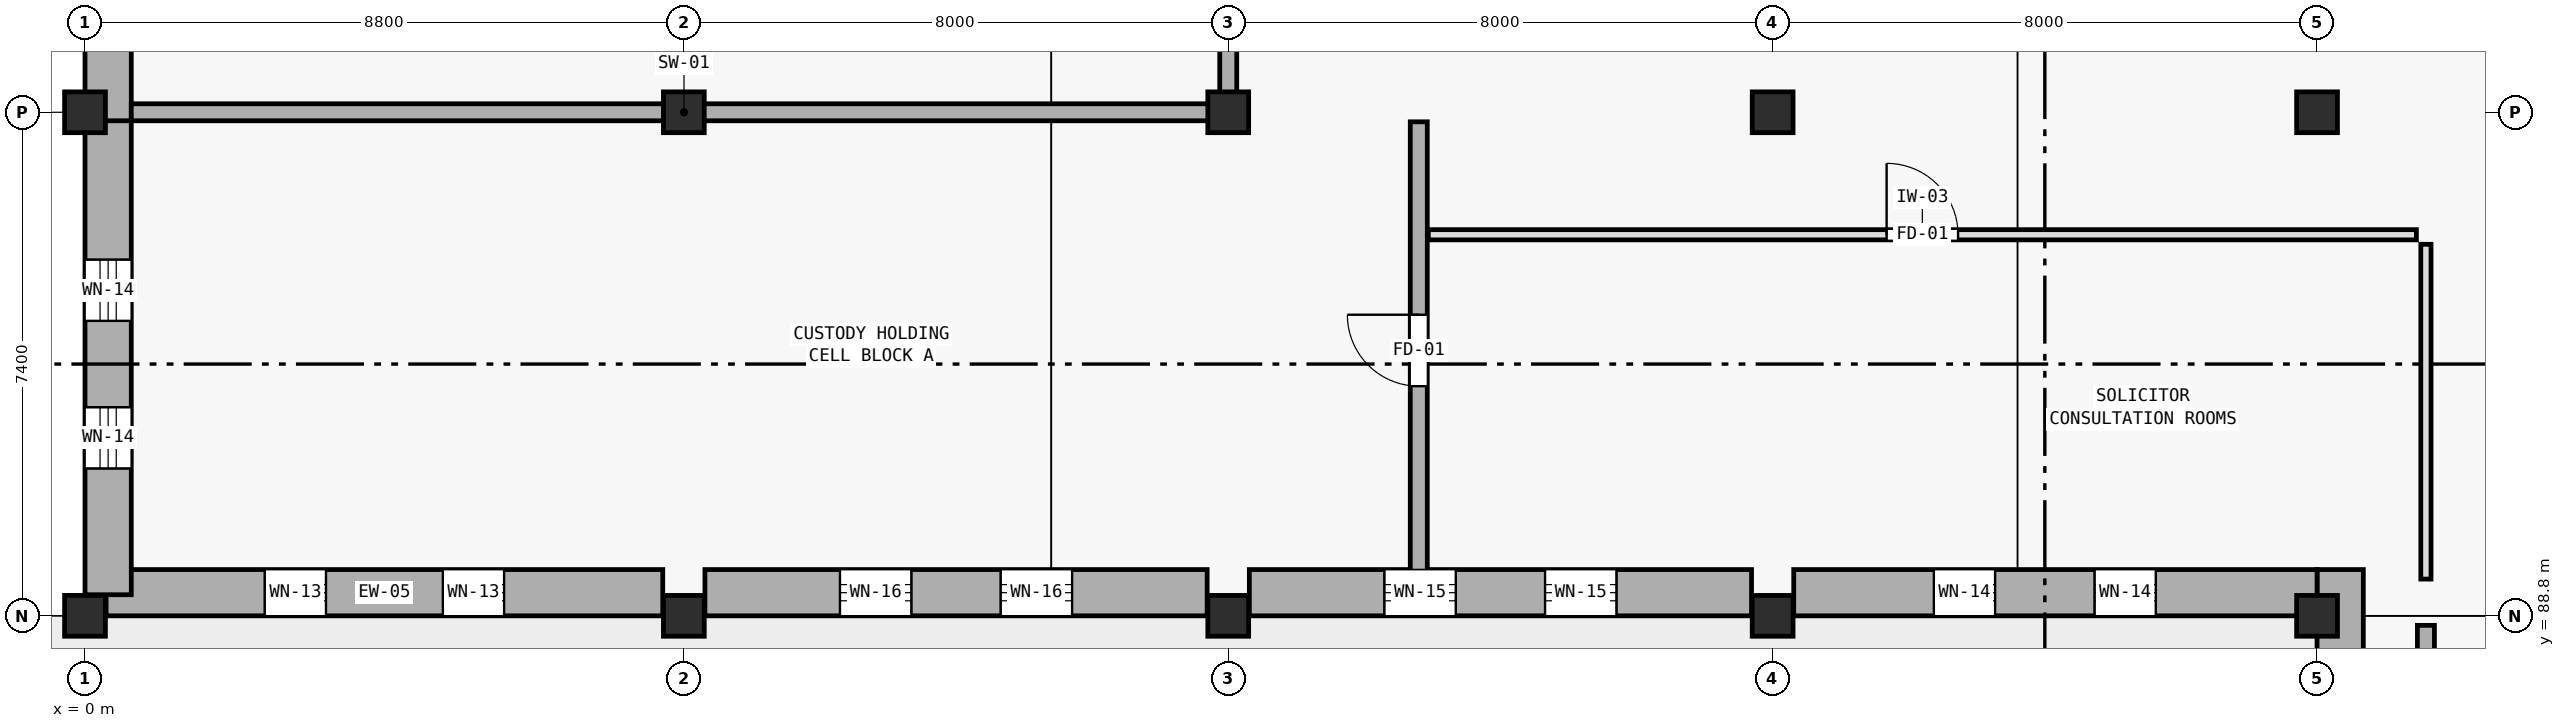
"""IFC4 building model, lengths in metres.
Left out: names, types, materials, properties, quantities, classifications, styles, units other than length and angle.
Written with IfcOpenShell. Run it as: python <this file> out.ifc"""

import sys

from ifc_helpers import new_model, si_unit, direction, frame, frame_2d, origin, origin_2d, place, context, subcontext, project, spatial, rectangle, extrude, element, fill, save


model = new_model("IFC4")
c1 = context("Model", 3, precision=1e-05, world=origin(), true_north=direction((0.0, 1.0)))
c2 = subcontext(c1, "Body", "Model", "MODEL_VIEW")
j1 = project(units=[si_unit("LENGTHUNIT", "METRE"), si_unit("PLANEANGLEUNIT", "RADIAN")], contexts=[c1])
p1 = place(None, origin())
s1 = spatial("IfcSite", under=j1, at=p1, CompositionType="ELEMENT")
p2 = place(p1, origin())
s2 = spatial("IfcBuilding", under=s1, at=p2, CompositionType="ELEMENT")
p3 = place(p2, origin())
s3 = spatial("IfcBuildingStorey", under=s2, at=p3, CompositionType="ELEMENT", Elevation=0.0)
for number, where, z_axis, x_axis in (
    (1, (0.0, 88.8, 0.0), (0.0, 0.0, 1.0), (1.0, 0.0, 0.0)),
    (2, (0.0, 96.2, 0.0), (0.0, 0.0, 1.0), (1.0, 0.0, 0.0)),
    (3, (8.8, 88.8, 0.0), (0.0, 0.0, 1.0), (1.0, 0.0, 0.0)),
    (4, (8.8, 96.2, 0.0), (0.0, 0.0, 1.0), (1.0, 0.0, 0.0)),
    (5, (16.8, 88.8, 0.0), (0.0, 0.0, 1.0), (1.0, 0.0, 0.0)),
    (6, (16.8, 96.2, 0.0), (0.0, 0.0, 1.0), (1.0, 0.0, 0.0)),
    (7, (24.8, 88.8, 0.0), (0.0, 0.0, 1.0), (1.0, 0.0, 0.0)),
    (8, (24.8, 96.2, 0.0), (0.0, 0.0, 1.0), (1.0, 0.0, 0.0)),
    (9, (32.8, 88.8, 0.0), (0.0, 0.0, 1.0), (1.0, 0.0, 0.0)),
    (10, (32.8, 96.2, 0.0), (0.0, 0.0, 1.0), (1.0, 0.0, 0.0)),
):
    element("IfcColumn", number, at=place(p3, frame(where, z_axis=z_axis, x_axis=x_axis)), inside=s3, PredefinedType="COLUMN", context=c2, shape_type="SweptSolid", body=[
        extrude(rectangle(XDim=0.6, YDim=0.6, at=origin_2d()), origin(), (0.0, 0.0, 1.0), 5.4),
    ])
p4 = place(p3, frame((33.14, 81.71, 0.0), z_axis=(0.0, 0.0, 1.0), x_axis=(0.0, 1.0, 0.0)))
e11 = element("IfcWall", 11, at=p4, inside=s3, PredefinedType="SOLIDWALL", context=c2, shape_type="SweptSolid", body=[
    extrude(rectangle(XDim=7.77, YDim=0.68, at=frame_2d((3.885, 0.0))), origin(), (0.0, 0.0, 1.0), 5.14),
])
p5 = place(p4, frame((1.855, 0.0, 1.8)))
e12 = element("IfcOpeningElement", 12, at=p5, cuts=e11, PredefinedType="OPENING", context=c2, shape_type="SweptSolid", body=[
    extrude(rectangle(XDim=0.9, YDim=0.9, at=frame_2d((0.45, 0.45))), frame((0.0, 0.35, 0.0), z_axis=(0.0, -1.0, 0.0), x_axis=(1.0, 0.0, 0.0)), (0.0, 0.0, 1.0), 0.7),
])
p6 = place(p4, frame((4.025, 0.0, 1.8)))
e13 = element("IfcOpeningElement", 13, at=p6, cuts=e11, PredefinedType="OPENING", context=c2, shape_type="SweptSolid", body=[
    extrude(rectangle(XDim=0.9, YDim=0.9, at=frame_2d((0.45, 0.45))), frame((0.0, 0.35, 0.0), z_axis=(0.0, -1.0, 0.0), x_axis=(1.0, 0.0, 0.0)), (0.0, 0.0, 1.0), 0.7),
])
p7 = place(p3, frame((32.8, 89.14, 0.0), z_axis=(0.0, 0.0, 1.0), x_axis=(-1.0, 0.0, 0.0)))
e14 = element("IfcWall", 14, at=p7, inside=s3, PredefinedType="SOLIDWALL", context=c2, shape_type="SweptSolid", body=[
    extrude(rectangle(XDim=7.69, YDim=0.68, at=frame_2d((3.845, 0.0))), origin(), (0.0, 0.0, 1.0), 5.14),
])
p8 = place(p7, frame((2.369, 0.0, 1.8)))
e15 = element("IfcOpeningElement", 15, at=p8, cuts=e14, PredefinedType="OPENING", context=c2, shape_type="SweptSolid", body=[
    extrude(rectangle(XDim=0.9, YDim=1.15, at=frame_2d((0.45, 0.575))), frame((0.0, 0.35, 0.0), z_axis=(0.0, -1.0, 0.0), x_axis=(1.0, 0.0, 0.0)), (0.0, 0.0, 1.0), 0.7),
])
p9 = place(p7, frame((4.731, 0.0, 1.8)))
e16 = element("IfcOpeningElement", 16, at=p9, cuts=e14, PredefinedType="OPENING", context=c2, shape_type="SweptSolid", body=[
    extrude(rectangle(XDim=0.9, YDim=1.15, at=frame_2d((0.45, 0.575))), frame((0.0, 0.35, 0.0), z_axis=(0.0, -1.0, 0.0), x_axis=(1.0, 0.0, 0.0)), (0.0, 0.0, 1.0), 0.7),
])
p10 = place(p3, frame((24.49, 89.14, 0.0), z_axis=(0.0, 0.0, 1.0), x_axis=(-1.0, 0.0, 0.0)))
e17 = element("IfcWall", 17, at=p10, inside=s3, PredefinedType="SOLIDWALL", context=c2, shape_type="SweptSolid", body=[
    extrude(rectangle(XDim=7.38, YDim=0.68, at=frame_2d((3.69, 0.0))), origin(), (0.0, 0.0, 1.0), 5.14),
])
p11 = place(p10, frame((1.984, 0.0, 1.8)))
e18 = element("IfcOpeningElement", 18, at=p11, cuts=e17, PredefinedType="OPENING", context=c2, shape_type="SweptSolid", body=[
    extrude(rectangle(XDim=1.05, YDim=0.95, at=frame_2d((0.525, 0.475))), frame((0.0, 0.35, 0.0), z_axis=(0.0, -1.0, 0.0), x_axis=(1.0, 0.0, 0.0)), (0.0, 0.0, 1.0), 0.7),
])
p12 = place(p10, frame((4.346, 0.0, 1.8)))
e19 = element("IfcOpeningElement", 19, at=p12, cuts=e17, PredefinedType="OPENING", context=c2, shape_type="SweptSolid", body=[
    extrude(rectangle(XDim=1.05, YDim=0.95, at=frame_2d((0.525, 0.475))), frame((0.0, 0.35, 0.0), z_axis=(0.0, -1.0, 0.0), x_axis=(1.0, 0.0, 0.0)), (0.0, 0.0, 1.0), 0.7),
])
p13 = place(p3, frame((16.49, 89.14, 0.0), z_axis=(0.0, 0.0, 1.0), x_axis=(-1.0, 0.0, 0.0)))
e20 = element("IfcWall", 20, at=p13, inside=s3, PredefinedType="SOLIDWALL", context=c2, shape_type="SweptSolid", body=[
    extrude(rectangle(XDim=7.38, YDim=0.68, at=frame_2d((3.69, 0.0))), origin(), (0.0, 0.0, 1.0), 5.14),
])
p14 = place(p13, frame((1.984, 0.0, 1.8)))
e21 = element("IfcOpeningElement", 21, at=p14, cuts=e20, PredefinedType="OPENING", context=c2, shape_type="SweptSolid", body=[
    extrude(rectangle(XDim=1.05, YDim=1.2, at=frame_2d((0.525, 0.6))), frame((0.0, 0.35, 0.0), z_axis=(0.0, -1.0, 0.0), x_axis=(1.0, 0.0, 0.0)), (0.0, 0.0, 1.0), 0.7),
])
p15 = place(p13, frame((4.346, 0.0, 1.8)))
e22 = element("IfcOpeningElement", 22, at=p15, cuts=e20, PredefinedType="OPENING", context=c2, shape_type="SweptSolid", body=[
    extrude(rectangle(XDim=1.05, YDim=1.2, at=frame_2d((0.525, 0.6))), frame((0.0, 0.35, 0.0), z_axis=(0.0, -1.0, 0.0), x_axis=(1.0, 0.0, 0.0)), (0.0, 0.0, 1.0), 0.7),
])
p16 = place(p3, frame((8.49, 89.14, 0.0), z_axis=(0.0, 0.0, 1.0), x_axis=(-1.0, 0.0, 0.0)))
e23 = element("IfcWall", 23, at=p16, inside=s3, PredefinedType="SOLIDWALL", context=c2, shape_type="SweptSolid", body=[
    extrude(rectangle(XDim=8.18, YDim=0.68, at=frame_2d((4.09, 0.0))), origin(), (0.0, 0.0, 1.0), 5.14),
])
p17 = place(p16, frame((2.331, 0.0, 1.8)))
e24 = element("IfcOpeningElement", 24, at=p17, cuts=e23, PredefinedType="OPENING", context=c2, shape_type="SweptSolid", body=[
    extrude(rectangle(XDim=0.9, YDim=0.9, at=frame_2d((0.45, 0.45))), frame((0.0, 0.35, 0.0), z_axis=(0.0, -1.0, 0.0), x_axis=(1.0, 0.0, 0.0)), (0.0, 0.0, 1.0), 0.7),
])
p18 = place(p16, frame((4.949, 0.0, 1.8)))
e25 = element("IfcOpeningElement", 25, at=p18, cuts=e23, PredefinedType="OPENING", context=c2, shape_type="SweptSolid", body=[
    extrude(rectangle(XDim=0.9, YDim=0.9, at=frame_2d((0.45, 0.45))), frame((0.0, 0.35, 0.0), z_axis=(0.0, -1.0, 0.0), x_axis=(1.0, 0.0, 0.0)), (0.0, 0.0, 1.0), 0.7),
])
p19 = place(p3, frame((0.34, 89.11, 0.0), z_axis=(0.0, 0.0, 1.0), x_axis=(0.0, 1.0, 0.0)))
e26 = element("IfcWall", 26, at=p19, inside=s3, PredefinedType="SOLIDWALL", context=c2, shape_type="SweptSolid", body=[
    extrude(rectangle(XDim=7.215, YDim=0.68, at=frame_2d((3.607, 0.0))), origin(), (0.0, 0.0, 1.0), 5.14),
])
p20 = place(p19, frame((1.855, 0.0, 1.8)))
e27 = element("IfcOpeningElement", 27, at=p20, cuts=e26, PredefinedType="OPENING", context=c2, shape_type="SweptSolid", body=[
    extrude(rectangle(XDim=0.9, YDim=1.15, at=frame_2d((0.45, 0.575))), frame((0.0, 0.35, 0.0), z_axis=(0.0, -1.0, 0.0), x_axis=(1.0, 0.0, 0.0)), (0.0, 0.0, 1.0), 0.7),
])
p21 = place(p19, frame((4.025, 0.0, 1.8)))
e28 = element("IfcOpeningElement", 28, at=p21, cuts=e26, PredefinedType="OPENING", context=c2, shape_type="SweptSolid", body=[
    extrude(rectangle(XDim=0.9, YDim=1.15, at=frame_2d((0.45, 0.575))), frame((0.0, 0.35, 0.0), z_axis=(0.0, -1.0, 0.0), x_axis=(1.0, 0.0, 0.0)), (0.0, 0.0, 1.0), 0.7),
])
p22 = place(p3, frame((0.34, 96.075, 0.0), z_axis=(0.0, 0.0, 1.0), x_axis=(0.0, 1.0, 0.0)))
e29 = element("IfcWall", 29, at=p22, inside=s3, PredefinedType="SOLIDWALL", context=c2, shape_type="SweptSolid", body=[
    extrude(rectangle(XDim=7.215, YDim=0.68, at=frame_2d((3.607, 0.0))), origin(), (0.0, 0.0, 1.0), 5.14),
])
p23 = place(p22, frame((1.725, 0.0, 0.0)))
e30 = element("IfcOpeningElement", 30, at=p23, cuts=e29, PredefinedType="OPENING", context=c2, shape_type="SweptSolid", body=[
    extrude(rectangle(XDim=4.2, YDim=4.2, at=frame_2d((2.1, 2.1))), frame((0.0, 0.35, 0.0), z_axis=(0.0, -1.0, 0.0), x_axis=(1.0, 0.0, 0.0)), (0.0, 0.0, 1.0), 0.7),
])
p24 = place(p3, frame((0.68, 96.2, 0.0), z_axis=(0.0, 0.0, 1.0), x_axis=(1.0, 0.0, 0.0)))
e31 = element("IfcWall", 31, at=p24, inside=s3, PredefinedType="SOLIDWALL", context=c2, shape_type="SweptSolid", body=[
    extrude(rectangle(XDim=16.245, YDim=0.25, at=frame_2d((8.123, 0.0))), origin(), (0.0, 0.0, 1.0), 4.27),
])
p25 = place(p3, frame((16.8, 96.325, 0.0), z_axis=(0.0, 0.0, 1.0), x_axis=(0.0, 1.0, 0.0)))
e32 = element("IfcWall", 32, at=p25, inside=s3, PredefinedType="SOLIDWALL", context=c2, shape_type="SweptSolid", body=[
    extrude(rectangle(XDim=13.995, YDim=0.25, at=frame_2d((6.998, 0.0))), origin(), (0.0, 0.0, 1.0), 4.27),
])
p26 = place(p25, frame((4.675, 0.0, 0.0)))
e33 = element("IfcOpeningElement", 33, at=p26, cuts=e32, PredefinedType="OPENING", context=c2, shape_type="SweptSolid", body=[
    extrude(rectangle(XDim=1.15, YDim=2.15, at=frame_2d((0.575, 1.075))), frame((0.0, 0.135, 0.0), z_axis=(0.0, -1.0, 0.0), x_axis=(1.0, 0.0, 0.0)), (0.0, 0.0, 1.0), 0.27),
])
p27 = place(p3, frame((19.6, 89.34, 0.0), z_axis=(0.0, 0.0, 1.0), x_axis=(0.0, 1.0, 0.0)))
e34 = element("IfcWall", 34, at=p27, inside=s3, PredefinedType="SOLIDWALL", context=c2, shape_type="SweptSolid", body=[
    extrude(rectangle(XDim=6.72, YDim=0.25, at=frame_2d((3.36, 0.0))), origin(), (0.0, 0.0, 1.0), 4.27),
])
p28 = place(p27, frame((2.835, 0.0, 0.0)))
e35 = element("IfcOpeningElement", 35, at=p28, cuts=e34, PredefinedType="OPENING", context=c2, shape_type="SweptSolid", body=[
    extrude(rectangle(XDim=1.05, YDim=2.15, at=frame_2d((0.525, 1.075))), frame((0.0, 0.135, 0.0), z_axis=(0.0, -1.0, 0.0), x_axis=(1.0, 0.0, 0.0)), (0.0, 0.0, 1.0), 0.27),
])
p29 = place(p3, frame((19.74, 94.4, 0.0), z_axis=(0.0, 0.0, 1.0), x_axis=(1.0, 0.0, 0.0)))
e36 = element("IfcWall", 36, at=p29, inside=s3, PredefinedType="PARTITIONING", context=c2, shape_type="SweptSolid", body=[
    extrude(rectangle(XDim=14.52, YDim=0.15, at=frame_2d((7.26, 0.0))), origin(), (0.0, 0.0, 1.0), 4.27),
])
p30 = place(p29, frame((6.735, 0.0, 0.0)))
e37 = element("IfcOpeningElement", 37, at=p30, cuts=e36, PredefinedType="OPENING", context=c2, shape_type="SweptSolid", body=[
    extrude(rectangle(XDim=1.05, YDim=2.15, at=frame_2d((0.525, 1.075))), frame((0.0, 0.085, 0.0), z_axis=(0.0, -1.0, 0.0), x_axis=(1.0, 0.0, 0.0)), (0.0, 0.0, 1.0), 0.17),
])
p31 = place(p3, frame((34.4, 89.34, 0.0), z_axis=(0.0, 0.0, 1.0), x_axis=(0.0, 1.0, 0.0)))
e38 = element("IfcWall", 38, at=p31, inside=s3, PredefinedType="PARTITIONING", context=c2, shape_type="SweptSolid", body=[
    extrude(rectangle(XDim=4.92, YDim=0.15, at=frame_2d((2.46, 0.0))), origin(), (0.0, 0.0, 1.0), 5.14),
])
p32 = place(p3, frame((34.4, 59.74, 0.0), z_axis=(0.0, 0.0, 1.0), x_axis=(0.0, 1.0, 0.0)))
e39 = element("IfcWall", 39, at=p32, inside=s3, PredefinedType="SOLIDWALL", context=c2, shape_type="SweptSolid", body=[
    extrude(rectangle(XDim=28.92, YDim=0.25, at=frame_2d((14.46, 0.0))), origin(), (0.0, 0.0, 1.0), 4.27),
])
p33 = place(p32, frame((9.547, 0.0, 0.0)))
e40 = element("IfcOpeningElement", 40, at=p33, cuts=e39, PredefinedType="OPENING", context=c2, shape_type="SweptSolid", body=[
    extrude(rectangle(XDim=1.15, YDim=2.15, at=frame_2d((0.575, 1.075))), frame((0.0, 0.135, 0.0), z_axis=(0.0, -1.0, 0.0), x_axis=(1.0, 0.0, 0.0)), (0.0, 0.0, 1.0), 0.27),
])
p34 = place(p8, origin())
e41 = element("IfcWindow", 41, at=p34, inside=s3, PartitioningType="SINGLE_PANEL", PredefinedType="WINDOW", context=c2, shape_type="SweptSolid", body=[
    extrude(rectangle(XDim=0.9, YDim=1.15, at=frame_2d((0.45, 0.575))), frame((0.0, 0.03, 0.0), z_axis=(0.0, -1.0, 0.0), x_axis=(1.0, 0.0, 0.0)), (0.0, 0.0, 1.0), 0.06),
])
fill(e15, e41)
p35 = place(p9, origin())
e42 = element("IfcWindow", 42, at=p35, inside=s3, PartitioningType="SINGLE_PANEL", PredefinedType="WINDOW", context=c2, shape_type="SweptSolid", body=[
    extrude(rectangle(XDim=0.9, YDim=1.15, at=frame_2d((0.45, 0.575))), frame((0.0, 0.03, 0.0), z_axis=(0.0, -1.0, 0.0), x_axis=(1.0, 0.0, 0.0)), (0.0, 0.0, 1.0), 0.06),
])
fill(e16, e42)
p36 = place(p11, origin())
e43 = element("IfcWindow", 43, at=p36, inside=s3, PartitioningType="SINGLE_PANEL", PredefinedType="WINDOW", context=c2, shape_type="SweptSolid", body=[
    extrude(rectangle(XDim=1.05, YDim=0.95, at=frame_2d((0.525, 0.475))), frame((0.0, 0.03, 0.0), z_axis=(0.0, -1.0, 0.0), x_axis=(1.0, 0.0, 0.0)), (0.0, 0.0, 1.0), 0.06),
])
fill(e18, e43)
p37 = place(p12, origin())
e44 = element("IfcWindow", 44, at=p37, inside=s3, PartitioningType="SINGLE_PANEL", PredefinedType="WINDOW", context=c2, shape_type="SweptSolid", body=[
    extrude(rectangle(XDim=1.05, YDim=0.95, at=frame_2d((0.525, 0.475))), frame((0.0, 0.03, 0.0), z_axis=(0.0, -1.0, 0.0), x_axis=(1.0, 0.0, 0.0)), (0.0, 0.0, 1.0), 0.06),
])
fill(e19, e44)
p38 = place(p14, origin())
e45 = element("IfcWindow", 45, at=p38, inside=s3, PartitioningType="SINGLE_PANEL", PredefinedType="WINDOW", context=c2, shape_type="SweptSolid", body=[
    extrude(rectangle(XDim=1.05, YDim=1.2, at=frame_2d((0.525, 0.6))), frame((0.0, 0.03, 0.0), z_axis=(0.0, -1.0, 0.0), x_axis=(1.0, 0.0, 0.0)), (0.0, 0.0, 1.0), 0.06),
])
fill(e21, e45)
p39 = place(p15, origin())
e46 = element("IfcWindow", 46, at=p39, inside=s3, PartitioningType="SINGLE_PANEL", PredefinedType="WINDOW", context=c2, shape_type="SweptSolid", body=[
    extrude(rectangle(XDim=1.05, YDim=1.2, at=frame_2d((0.525, 0.6))), frame((0.0, 0.03, 0.0), z_axis=(0.0, -1.0, 0.0), x_axis=(1.0, 0.0, 0.0)), (0.0, 0.0, 1.0), 0.06),
])
fill(e22, e46)
p40 = place(p17, origin())
e47 = element("IfcWindow", 47, at=p40, inside=s3, PartitioningType="SINGLE_PANEL", PredefinedType="WINDOW", context=c2, shape_type="SweptSolid", body=[
    extrude(rectangle(XDim=0.9, YDim=0.9, at=frame_2d((0.45, 0.45))), frame((0.0, 0.03, 0.0), z_axis=(0.0, -1.0, 0.0), x_axis=(1.0, 0.0, 0.0)), (0.0, 0.0, 1.0), 0.06),
])
fill(e24, e47)
p41 = place(p18, origin())
e48 = element("IfcWindow", 48, at=p41, inside=s3, PartitioningType="SINGLE_PANEL", PredefinedType="WINDOW", context=c2, shape_type="SweptSolid", body=[
    extrude(rectangle(XDim=0.9, YDim=0.9, at=frame_2d((0.45, 0.45))), frame((0.0, 0.03, 0.0), z_axis=(0.0, -1.0, 0.0), x_axis=(1.0, 0.0, 0.0)), (0.0, 0.0, 1.0), 0.06),
])
fill(e25, e48)
p42 = place(p20, origin())
e49 = element("IfcWindow", 49, at=p42, inside=s3, PartitioningType="SINGLE_PANEL", PredefinedType="WINDOW", context=c2, shape_type="SweptSolid", body=[
    extrude(rectangle(XDim=0.9, YDim=1.15, at=frame_2d((0.45, 0.575))), frame((0.0, 0.03, 0.0), z_axis=(0.0, -1.0, 0.0), x_axis=(1.0, 0.0, 0.0)), (0.0, 0.0, 1.0), 0.06),
])
fill(e27, e49)
p43 = place(p21, origin())
e50 = element("IfcWindow", 50, at=p43, inside=s3, PartitioningType="SINGLE_PANEL", PredefinedType="WINDOW", context=c2, shape_type="SweptSolid", body=[
    extrude(rectangle(XDim=0.9, YDim=1.15, at=frame_2d((0.45, 0.575))), frame((0.0, 0.03, 0.0), z_axis=(0.0, -1.0, 0.0), x_axis=(1.0, 0.0, 0.0)), (0.0, 0.0, 1.0), 0.06),
])
fill(e28, e50)
p44 = place(p28, origin())
e51 = element("IfcDoor", 51, at=p44, inside=s3, OperationType="SINGLE_SWING_RIGHT", PredefinedType="DOOR", context=c2, shape_type="SweptSolid", body=[
    extrude(rectangle(XDim=1.05, YDim=2.15, at=frame_2d((0.525, 1.075))), frame((0.0, 0.025, 0.0), z_axis=(0.0, -1.0, 0.0), x_axis=(1.0, 0.0, 0.0)), (0.0, 0.0, 1.0), 0.05),
])
fill(e35, e51)
p45 = place(p30, origin())
e52 = element("IfcDoor", 52, at=p45, inside=s3, OperationType="SINGLE_SWING_LEFT", PredefinedType="DOOR", context=c2, shape_type="SweptSolid", body=[
    extrude(rectangle(XDim=1.05, YDim=2.15, at=frame_2d((0.525, 1.075))), frame((0.0, 0.025, 0.0), z_axis=(0.0, -1.0, 0.0), x_axis=(1.0, 0.0, 0.0)), (0.0, 0.0, 1.0), 0.05),
])
fill(e37, e52)
save(model, sys.argv[1])
